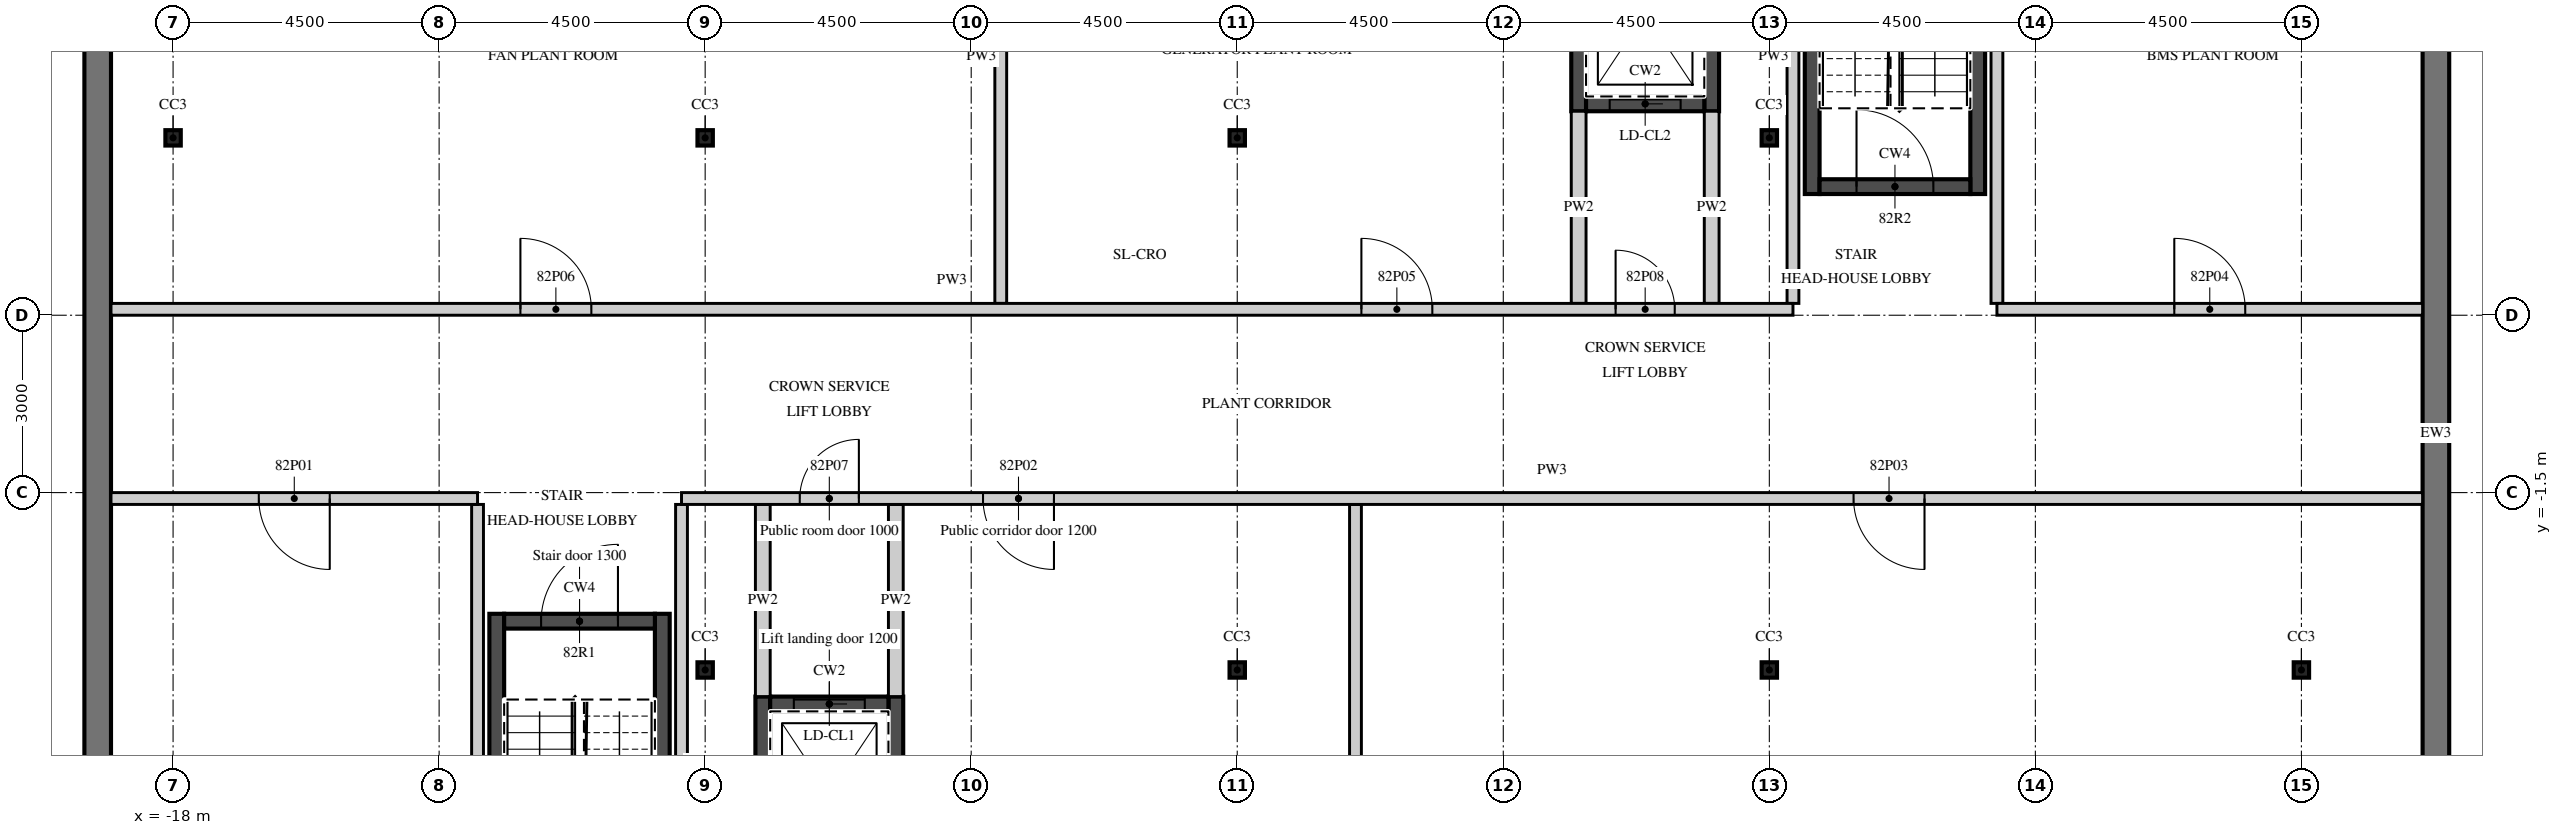
"""IFC4 building model, lengths in metres.
Left out: names, types, materials, properties, quantities, classifications, styles, units other than length and angle.
Written with IfcOpenShell. Run it as: python <this file> out.ifc"""

import sys

from ifc_helpers import new_model, si_unit, direction, frame, frame_2d, origin, origin_2d, place, context, subcontext, project, spatial, rectangle, i_section, extrude, element, fill, save


model = new_model("IFC4")
c1 = context("Model", 3, precision=1e-05, world=origin(), true_north=direction((0.0, 1.0)))
c2 = subcontext(c1, "Body", "Model", "MODEL_VIEW")
j1 = project(units=[si_unit("LENGTHUNIT", "METRE"), si_unit("PLANEANGLEUNIT", "RADIAN")], contexts=[c1])
p1 = place(None, origin())
s1 = spatial("IfcSite", under=j1, at=p1, CompositionType="ELEMENT")
p2 = place(p1, origin())
s2 = spatial("IfcBuilding", under=s1, at=p2, CompositionType="ELEMENT")
p3 = place(p2, frame((0.0, 0.0, 325.8)))
s3 = spatial("IfcBuildingStorey", under=s2, at=p3, CompositionType="ELEMENT", Elevation=325.8)
for number, where, z_axis, x_axis in (
    (1, (-18.0, 4.5, 0.0), (0.0, 0.0, 1.0), (1.0, 0.0, 0.0)),
    (2, (-9.0, -4.5, 0.0), (0.0, 0.0, 1.0), (1.0, 0.0, 0.0)),
    (3, (-9.0, 4.5, 0.0), (0.0, 0.0, 1.0), (1.0, 0.0, 0.0)),
    (4, (0.0, -4.5, 0.0), (0.0, 0.0, 1.0), (1.0, 0.0, 0.0)),
    (5, (0.0, 4.5, 0.0), (0.0, 0.0, 1.0), (1.0, 0.0, 0.0)),
    (6, (9.0, -4.5, 0.0), (0.0, 0.0, 1.0), (1.0, 0.0, 0.0)),
    (7, (9.0, 4.5, 0.0), (0.0, 0.0, 1.0), (1.0, 0.0, 0.0)),
    (8, (18.0, -4.5, 0.0), (0.0, 0.0, 1.0), (1.0, 0.0, 0.0)),
):
    element("IfcColumn", number, at=place(p3, frame(where, z_axis=z_axis, x_axis=x_axis)), inside=s3, PredefinedType="COLUMN", context=c2, shape_type="SweptSolid", body=[
        extrude(i_section(OverallWidth=0.26, OverallDepth=0.26, WebThickness=0.01, FlangeThickness=0.018, FilletRadius=0.024, at=origin_2d()), origin(), (0.0, 0.0, 1.0), 4.0),
    ])
for number, where, z_axis, x_axis in (
    (9, (20.275, -7.5, 0.0), (0.0, 0.0, 1.0), (0.0, 1.0, 0.0)),
    (10, (-19.275, 6.5, 0.0), (0.0, 0.0, 1.0), (0.0, -1.0, 0.0)),
):
    element("IfcWall", number, at=place(p3, frame(where, z_axis=z_axis, x_axis=x_axis)), inside=s3, PredefinedType="SOLIDWALL", context=c2, shape_type="SweptSolid", body=[
        extrude(rectangle(XDim=14.0, YDim=0.45, at=frame_2d((7.0, 0.0))), origin(), (0.0, 0.0, 1.0), 3.65),
    ])
for number, where, z_axis, x_axis in (
    (11, (-8.025, -8.0, 0.0), (0.0, 0.0, 1.0), (0.0, 1.0, 0.0)),
    (12, (-5.775, -8.0, 0.0), (0.0, 0.0, 1.0), (0.0, 1.0, 0.0)),
):
    element("IfcWall", number, at=place(p3, frame(where, z_axis=z_axis, x_axis=x_axis)), inside=s3, PredefinedType="SHEAR", context=c2, shape_type="SweptSolid", body=[
        extrude(rectangle(XDim=3.05, YDim=0.25, at=frame_2d((1.525, 0.0))), origin(), (0.0, 0.0, 1.0), 3.4),
    ])
p4 = place(p3, frame((-7.9, -5.075, 0.0), z_axis=(0.0, 0.0, 1.0), x_axis=(1.0, 0.0, 0.0)))
e13 = element("IfcWall", 13, at=p4, inside=s3, PredefinedType="SHEAR", context=c2, shape_type="SweptSolid", body=[
    extrude(rectangle(XDim=2.0, YDim=0.25, at=frame_2d((1.0, 0.0))), origin(), (0.0, 0.0, 1.0), 3.4),
])
p5 = place(p4, frame((0.4, 0.0, 0.0)))
e14 = element("IfcOpeningElement", 14, at=p5, cuts=e13, PredefinedType="OPENING", context=c2, shape_type="SweptSolid", body=[
    extrude(rectangle(XDim=1.2, YDim=2.1, at=frame_2d((0.6, 1.05))), frame((0.0, 0.135, 0.0), z_axis=(0.0, -1.0, 0.0), x_axis=(1.0, 0.0, 0.0)), (0.0, 0.0, 1.0), 0.27),
])
for number, where, z_axis, x_axis in (
    (15, (-8.025, -4.95, 0.0), (0.0, 0.0, 1.0), (0.0, 1.0, 0.0)),
    (16, (-5.775, -4.95, 0.0), (0.0, 0.0, 1.0), (0.0, 1.0, 0.0)),
):
    element("IfcWall", number, at=place(p3, frame(where, z_axis=z_axis, x_axis=x_axis)), inside=s3, PredefinedType="PARTITIONING", context=c2, shape_type="SweptSolid", body=[
        extrude(rectangle(XDim=3.25, YDim=0.25, at=frame_2d((1.625, 0.0))), origin(), (0.0, 0.0, 1.0), 3.4),
    ])
for number, where, z_axis, x_axis in (
    (17, (8.025, 4.95, 0.0), (0.0, 0.0, 1.0), (0.0, 1.0, 0.0)),
    (18, (5.775, 4.95, 0.0), (0.0, 0.0, 1.0), (0.0, 1.0, 0.0)),
):
    element("IfcWall", number, at=place(p3, frame(where, z_axis=z_axis, x_axis=x_axis)), inside=s3, PredefinedType="SHEAR", context=c2, shape_type="SweptSolid", body=[
        extrude(rectangle(XDim=3.05, YDim=0.25, at=frame_2d((1.525, 0.0))), origin(), (0.0, 0.0, 1.0), 3.4),
    ])
p6 = place(p3, frame((5.9, 5.075, 0.0), z_axis=(0.0, 0.0, 1.0), x_axis=(1.0, 0.0, 0.0)))
e19 = element("IfcWall", 19, at=p6, inside=s3, PredefinedType="SHEAR", context=c2, shape_type="SweptSolid", body=[
    extrude(rectangle(XDim=2.0, YDim=0.25, at=frame_2d((1.0, 0.0))), origin(), (0.0, 0.0, 1.0), 3.4),
])
p7 = place(p6, frame((0.4, 0.0, 0.0)))
e20 = element("IfcOpeningElement", 20, at=p7, cuts=e19, PredefinedType="OPENING", context=c2, shape_type="SweptSolid", body=[
    extrude(rectangle(XDim=1.2, YDim=2.1, at=frame_2d((0.6, 1.05))), frame((0.0, 0.135, 0.0), z_axis=(0.0, -1.0, 0.0), x_axis=(1.0, 0.0, 0.0)), (0.0, 0.0, 1.0), 0.27),
])
for number, where, z_axis, x_axis in (
    (21, (8.025, 1.7, 0.0), (0.0, 0.0, 1.0), (0.0, 1.0, 0.0)),
    (22, (5.775, 1.7, 0.0), (0.0, 0.0, 1.0), (0.0, 1.0, 0.0)),
):
    element("IfcWall", number, at=place(p3, frame(where, z_axis=z_axis, x_axis=x_axis)), inside=s3, PredefinedType="PARTITIONING", context=c2, shape_type="SweptSolid", body=[
        extrude(rectangle(XDim=3.25, YDim=0.25, at=frame_2d((1.625, 0.0))), origin(), (0.0, 0.0, 1.0), 3.4),
    ])
for number, where, z_axis, x_axis in (
    (23, (-12.525, -9.85, 0.0), (0.0, 0.0, 1.0), (0.0, 1.0, 0.0)),
    (24, (-9.725, -9.85, 0.0), (0.0, 0.0, 1.0), (0.0, 1.0, 0.0)),
):
    element("IfcWall", number, at=place(p3, frame(where, z_axis=z_axis, x_axis=x_axis)), inside=s3, PredefinedType="SHEAR", context=c2, shape_type="SweptSolid", body=[
        extrude(rectangle(XDim=6.3, YDim=0.25, at=frame_2d((3.15, 0.0))), origin(), (0.0, 0.0, 1.0), 3.65),
    ])
p8 = place(p3, frame((-12.4, -3.675, 0.0), z_axis=(0.0, 0.0, 1.0), x_axis=(1.0, 0.0, 0.0)))
e25 = element("IfcWall", 25, at=p8, inside=s3, PredefinedType="SHEAR", context=c2, shape_type="SweptSolid", body=[
    extrude(rectangle(XDim=2.55, YDim=0.25, at=frame_2d((1.275, 0.0))), origin(), (0.0, 0.0, 1.0), 3.65),
])
p9 = place(p8, frame((0.625, 0.0, 0.0)))
e26 = element("IfcOpeningElement", 26, at=p9, cuts=e25, PredefinedType="OPENING", context=c2, shape_type="SweptSolid", body=[
    extrude(rectangle(XDim=1.3, YDim=2.1, at=frame_2d((0.65, 1.05))), frame((0.0, 0.135, 0.0), z_axis=(0.0, -1.0, 0.0), x_axis=(1.0, 0.0, 0.0)), (0.0, 0.0, 1.0), 0.27),
])
for number, where, z_axis, x_axis in (
    (27, (9.725, 3.55, 0.0), (0.0, 0.0, 1.0), (0.0, 1.0, 0.0)),
    (28, (12.525, 3.55, 0.0), (0.0, 0.0, 1.0), (0.0, 1.0, 0.0)),
):
    element("IfcWall", number, at=place(p3, frame(where, z_axis=z_axis, x_axis=x_axis)), inside=s3, PredefinedType="SHEAR", context=c2, shape_type="SweptSolid", body=[
        extrude(rectangle(XDim=6.3, YDim=0.25, at=frame_2d((3.15, 0.0))), origin(), (0.0, 0.0, 1.0), 3.65),
    ])
p10 = place(p3, frame((9.85, 3.675, 0.0), z_axis=(0.0, 0.0, 1.0), x_axis=(1.0, 0.0, 0.0)))
e29 = element("IfcWall", 29, at=p10, inside=s3, PredefinedType="SHEAR", context=c2, shape_type="SweptSolid", body=[
    extrude(rectangle(XDim=2.55, YDim=0.25, at=frame_2d((1.275, 0.0))), origin(), (0.0, 0.0, 1.0), 3.65),
])
p11 = place(p10, frame((0.625, 0.0, 0.0)))
e30 = element("IfcOpeningElement", 30, at=p11, cuts=e29, PredefinedType="OPENING", context=c2, shape_type="SweptSolid", body=[
    extrude(rectangle(XDim=1.3, YDim=2.1, at=frame_2d((0.65, 1.05))), frame((0.0, 0.135, 0.0), z_axis=(0.0, -1.0, 0.0), x_axis=(1.0, 0.0, 0.0)), (0.0, 0.0, 1.0), 0.27),
])
for number, where, z_axis, x_axis in (
    (31, (-12.85, -11.05, 0.0), (0.0, 0.0, 1.0), (0.0, 1.0, 0.0)),
    (32, (-9.4, -11.05, 0.0), (0.0, 0.0, 1.0), (0.0, 1.0, 0.0)),
    (33, (2.0, -11.05, 0.0), (0.0, 0.0, 1.0), (0.0, 1.0, 0.0)),
):
    element("IfcWall", number, at=place(p3, frame(where, z_axis=z_axis, x_axis=x_axis)), inside=s3, PredefinedType="PARTITIONING", context=c2, shape_type="SweptSolid", body=[
        extrude(rectangle(XDim=9.35, YDim=0.2, at=frame_2d((4.675, 0.0))), origin(), (0.0, 0.0, 1.0), 3.65),
    ])
p12 = place(p3, frame((-19.05, -1.6, 0.0), z_axis=(0.0, 0.0, 1.0), x_axis=(1.0, 0.0, 0.0)))
e34 = element("IfcWall", 34, at=p12, inside=s3, PredefinedType="PARTITIONING", context=c2, shape_type="SweptSolid", body=[
    extrude(rectangle(XDim=6.2, YDim=0.2, at=frame_2d((3.1, 0.0))), origin(), (0.0, 0.0, 1.0), 3.65),
])
p13 = place(p12, frame((2.5, 0.0, 0.0)))
e35 = element("IfcOpeningElement", 35, at=p13, cuts=e34, PredefinedType="OPENING", context=c2, shape_type="SweptSolid", body=[
    extrude(rectangle(XDim=1.2, YDim=2.1, at=frame_2d((0.6, 1.05))), frame((0.0, 0.11, 0.0), z_axis=(0.0, -1.0, 0.0), x_axis=(1.0, 0.0, 0.0)), (0.0, 0.0, 1.0), 0.22),
])
p14 = place(p3, frame((-9.4, -1.6, 0.0), z_axis=(0.0, 0.0, 1.0), x_axis=(1.0, 0.0, 0.0)))
e36 = element("IfcWall", 36, at=p14, inside=s3, PredefinedType="PARTITIONING", context=c2, shape_type="SweptSolid", body=[
    extrude(rectangle(XDim=29.45, YDim=0.2, at=frame_2d((14.725, 0.0))), origin(), (0.0, 0.0, 1.0), 3.25),
])
p15 = place(p14, frame((5.1, 0.0, 0.0)))
e37 = element("IfcOpeningElement", 37, at=p15, cuts=e36, PredefinedType="OPENING", context=c2, shape_type="SweptSolid", body=[
    extrude(rectangle(XDim=1.2, YDim=2.1, at=frame_2d((0.6, 1.05))), frame((0.0, 0.11, 0.0), z_axis=(0.0, -1.0, 0.0), x_axis=(1.0, 0.0, 0.0)), (0.0, 0.0, 1.0), 0.22),
])
p16 = place(p14, frame((19.825, 0.0, 0.0)))
e38 = element("IfcOpeningElement", 38, at=p16, cuts=e36, PredefinedType="OPENING", context=c2, shape_type="SweptSolid", body=[
    extrude(rectangle(XDim=1.2, YDim=2.1, at=frame_2d((0.6, 1.05))), frame((0.0, 0.11, 0.0), z_axis=(0.0, -1.0, 0.0), x_axis=(1.0, 0.0, 0.0)), (0.0, 0.0, 1.0), 0.22),
])
p17 = place(p14, frame((2.0, 0.0, 0.0)))
e39 = element("IfcOpeningElement", 39, at=p17, cuts=e36, PredefinedType="OPENING", context=c2, shape_type="SweptSolid", body=[
    extrude(rectangle(XDim=1.0, YDim=2.1, at=frame_2d((0.5, 1.05))), frame((0.0, 0.11, 0.0), z_axis=(0.0, -1.0, 0.0), x_axis=(1.0, 0.0, 0.0)), (0.0, 0.0, 1.0), 0.22),
])
for number, where, z_axis, x_axis in (
    (40, (12.85, 1.7, 0.0), (0.0, 0.0, 1.0), (0.0, 1.0, 0.0)),
    (41, (9.4, 1.7, 0.0), (0.0, 0.0, 1.0), (0.0, 1.0, 0.0)),
    (42, (-4.0, 1.7, 0.0), (0.0, 0.0, 1.0), (0.0, 1.0, 0.0)),
):
    element("IfcWall", number, at=place(p3, frame(where, z_axis=z_axis, x_axis=x_axis)), inside=s3, PredefinedType="PARTITIONING", context=c2, shape_type="SweptSolid", body=[
        extrude(rectangle(XDim=8.35, YDim=0.2, at=frame_2d((4.175, 0.0))), origin(), (0.0, 0.0, 1.0), 3.65),
    ])
p18 = place(p3, frame((12.85, 1.6, 0.0), z_axis=(0.0, 0.0, 1.0), x_axis=(1.0, 0.0, 0.0)))
e43 = element("IfcWall", 43, at=p18, inside=s3, PredefinedType="PARTITIONING", context=c2, shape_type="SweptSolid", body=[
    extrude(rectangle(XDim=7.2, YDim=0.2, at=frame_2d((3.6, 0.0))), origin(), (0.0, 0.0, 1.0), 3.65),
])
p19 = place(p18, frame((3.0, 0.0, 0.0)))
e44 = element("IfcOpeningElement", 44, at=p19, cuts=e43, PredefinedType="OPENING", context=c2, shape_type="SweptSolid", body=[
    extrude(rectangle(XDim=1.2, YDim=2.1, at=frame_2d((0.6, 1.05))), frame((0.0, 0.11, 0.0), z_axis=(0.0, -1.0, 0.0), x_axis=(1.0, 0.0, 0.0)), (0.0, 0.0, 1.0), 0.22),
])
p20 = place(p3, frame((-19.05, 1.6, 0.0), z_axis=(0.0, 0.0, 1.0), x_axis=(1.0, 0.0, 0.0)))
e45 = element("IfcWall", 45, at=p20, inside=s3, PredefinedType="PARTITIONING", context=c2, shape_type="SweptSolid", body=[
    extrude(rectangle(XDim=28.45, YDim=0.2, at=frame_2d((14.225, 0.0))), origin(), (0.0, 0.0, 1.0), 3.25),
])
p21 = place(p20, frame((21.15, 0.0, 0.0)))
e46 = element("IfcOpeningElement", 46, at=p21, cuts=e45, PredefinedType="OPENING", context=c2, shape_type="SweptSolid", body=[
    extrude(rectangle(XDim=1.2, YDim=2.1, at=frame_2d((0.6, 1.05))), frame((0.0, 0.11, 0.0), z_axis=(0.0, -1.0, 0.0), x_axis=(1.0, 0.0, 0.0)), (0.0, 0.0, 1.0), 0.22),
])
p22 = place(p20, frame((6.925, 0.0, 0.0)))
e47 = element("IfcOpeningElement", 47, at=p22, cuts=e45, PredefinedType="OPENING", context=c2, shape_type="SweptSolid", body=[
    extrude(rectangle(XDim=1.2, YDim=2.1, at=frame_2d((0.6, 1.05))), frame((0.0, 0.11, 0.0), z_axis=(0.0, -1.0, 0.0), x_axis=(1.0, 0.0, 0.0)), (0.0, 0.0, 1.0), 0.22),
])
p23 = place(p20, frame((25.45, 0.0, 0.0)))
e48 = element("IfcOpeningElement", 48, at=p23, cuts=e45, PredefinedType="OPENING", context=c2, shape_type="SweptSolid", body=[
    extrude(rectangle(XDim=1.0, YDim=2.1, at=frame_2d((0.5, 1.05))), frame((0.0, 0.11, 0.0), z_axis=(0.0, -1.0, 0.0), x_axis=(1.0, 0.0, 0.0)), (0.0, 0.0, 1.0), 0.22),
])
p24 = place(p5, origin())
e49 = element("IfcDoor", 49, at=p24, inside=s3, OperationType="SLIDING_TO_LEFT", PredefinedType="DOOR", context=c2, shape_type="SweptSolid", body=[
    extrude(rectangle(XDim=1.2, YDim=2.1, at=frame_2d((0.6, 1.05))), frame((0.0, 0.025, 0.0), z_axis=(0.0, -1.0, 0.0), x_axis=(1.0, 0.0, 0.0)), (0.0, 0.0, 1.0), 0.05),
])
fill(e14, e49)
p25 = place(p7, origin())
e50 = element("IfcDoor", 50, at=p25, inside=s3, OperationType="SLIDING_TO_LEFT", PredefinedType="DOOR", context=c2, shape_type="SweptSolid", body=[
    extrude(rectangle(XDim=1.2, YDim=2.1, at=frame_2d((0.6, 1.05))), frame((0.0, 0.025, 0.0), z_axis=(0.0, -1.0, 0.0), x_axis=(1.0, 0.0, 0.0)), (0.0, 0.0, 1.0), 0.05),
])
fill(e20, e50)
p26 = place(p9, origin())
e51 = element("IfcDoor", 51, at=p26, inside=s3, OperationType="SINGLE_SWING_RIGHT", PredefinedType="DOOR", context=c2, shape_type="SweptSolid", body=[
    extrude(rectangle(XDim=1.3, YDim=2.1, at=frame_2d((0.65, 1.05))), frame((0.0, 0.025, 0.0), z_axis=(0.0, -1.0, 0.0), x_axis=(1.0, 0.0, 0.0)), (0.0, 0.0, 1.0), 0.05),
])
fill(e26, e51)
p27 = place(p11, origin())
e52 = element("IfcDoor", 52, at=p27, inside=s3, OperationType="SINGLE_SWING_LEFT", PredefinedType="DOOR", context=c2, shape_type="SweptSolid", body=[
    extrude(rectangle(XDim=1.3, YDim=2.1, at=frame_2d((0.65, 1.05))), frame((0.0, 0.025, 0.0), z_axis=(0.0, -1.0, 0.0), x_axis=(1.0, 0.0, 0.0)), (0.0, 0.0, 1.0), 0.05),
])
fill(e30, e52)
p28 = place(p13, origin())
e53 = element("IfcDoor", 53, at=p28, inside=s3, OperationType="SINGLE_SWING_RIGHT", PredefinedType="DOOR", context=c2, shape_type="SweptSolid", body=[
    extrude(rectangle(XDim=1.2, YDim=2.1, at=frame_2d((0.6, 1.05))), frame((0.0, 0.025, 0.0), z_axis=(0.0, -1.0, 0.0), x_axis=(1.0, 0.0, 0.0)), (0.0, 0.0, 1.0), 0.05),
])
fill(e35, e53)
p29 = place(p15, origin())
e54 = element("IfcDoor", 54, at=p29, inside=s3, OperationType="SINGLE_SWING_RIGHT", PredefinedType="DOOR", context=c2, shape_type="SweptSolid", body=[
    extrude(rectangle(XDim=1.2, YDim=2.1, at=frame_2d((0.6, 1.05))), frame((0.0, 0.025, 0.0), z_axis=(0.0, -1.0, 0.0), x_axis=(1.0, 0.0, 0.0)), (0.0, 0.0, 1.0), 0.05),
])
fill(e37, e54)
p30 = place(p16, origin())
e55 = element("IfcDoor", 55, at=p30, inside=s3, OperationType="SINGLE_SWING_RIGHT", PredefinedType="DOOR", context=c2, shape_type="SweptSolid", body=[
    extrude(rectangle(XDim=1.2, YDim=2.1, at=frame_2d((0.6, 1.05))), frame((0.0, 0.025, 0.0), z_axis=(0.0, -1.0, 0.0), x_axis=(1.0, 0.0, 0.0)), (0.0, 0.0, 1.0), 0.05),
])
fill(e38, e55)
p31 = place(p19, origin())
e56 = element("IfcDoor", 56, at=p31, inside=s3, OperationType="SINGLE_SWING_LEFT", PredefinedType="DOOR", context=c2, shape_type="SweptSolid", body=[
    extrude(rectangle(XDim=1.2, YDim=2.1, at=frame_2d((0.6, 1.05))), frame((0.0, 0.025, 0.0), z_axis=(0.0, -1.0, 0.0), x_axis=(1.0, 0.0, 0.0)), (0.0, 0.0, 1.0), 0.05),
])
fill(e44, e56)
p32 = place(p21, origin())
e57 = element("IfcDoor", 57, at=p32, inside=s3, OperationType="SINGLE_SWING_LEFT", PredefinedType="DOOR", context=c2, shape_type="SweptSolid", body=[
    extrude(rectangle(XDim=1.2, YDim=2.1, at=frame_2d((0.6, 1.05))), frame((0.0, 0.025, 0.0), z_axis=(0.0, -1.0, 0.0), x_axis=(1.0, 0.0, 0.0)), (0.0, 0.0, 1.0), 0.05),
])
fill(e46, e57)
p33 = place(p22, origin())
e58 = element("IfcDoor", 58, at=p33, inside=s3, OperationType="SINGLE_SWING_LEFT", PredefinedType="DOOR", context=c2, shape_type="SweptSolid", body=[
    extrude(rectangle(XDim=1.2, YDim=2.1, at=frame_2d((0.6, 1.05))), frame((0.0, 0.025, 0.0), z_axis=(0.0, -1.0, 0.0), x_axis=(1.0, 0.0, 0.0)), (0.0, 0.0, 1.0), 0.05),
])
fill(e47, e58)
p34 = place(p17, origin())
e59 = element("IfcDoor", 59, at=p34, inside=s3, OperationType="SINGLE_SWING_RIGHT", PredefinedType="DOOR", context=c2, shape_type="SweptSolid", body=[
    extrude(rectangle(XDim=1.0, YDim=2.1, at=frame_2d((0.5, 1.05))), frame((0.0, 0.025, 0.0), z_axis=(0.0, -1.0, 0.0), x_axis=(1.0, 0.0, 0.0)), (0.0, 0.0, 1.0), 0.05),
])
fill(e39, e59)
p35 = place(p23, origin())
e60 = element("IfcDoor", 60, at=p35, inside=s3, OperationType="SINGLE_SWING_LEFT", PredefinedType="DOOR", context=c2, shape_type="SweptSolid", body=[
    extrude(rectangle(XDim=1.0, YDim=2.1, at=frame_2d((0.5, 1.05))), frame((0.0, 0.025, 0.0), z_axis=(0.0, -1.0, 0.0), x_axis=(1.0, 0.0, 0.0)), (0.0, 0.0, 1.0), 0.05),
])
fill(e48, e60)
save(model, sys.argv[1])
